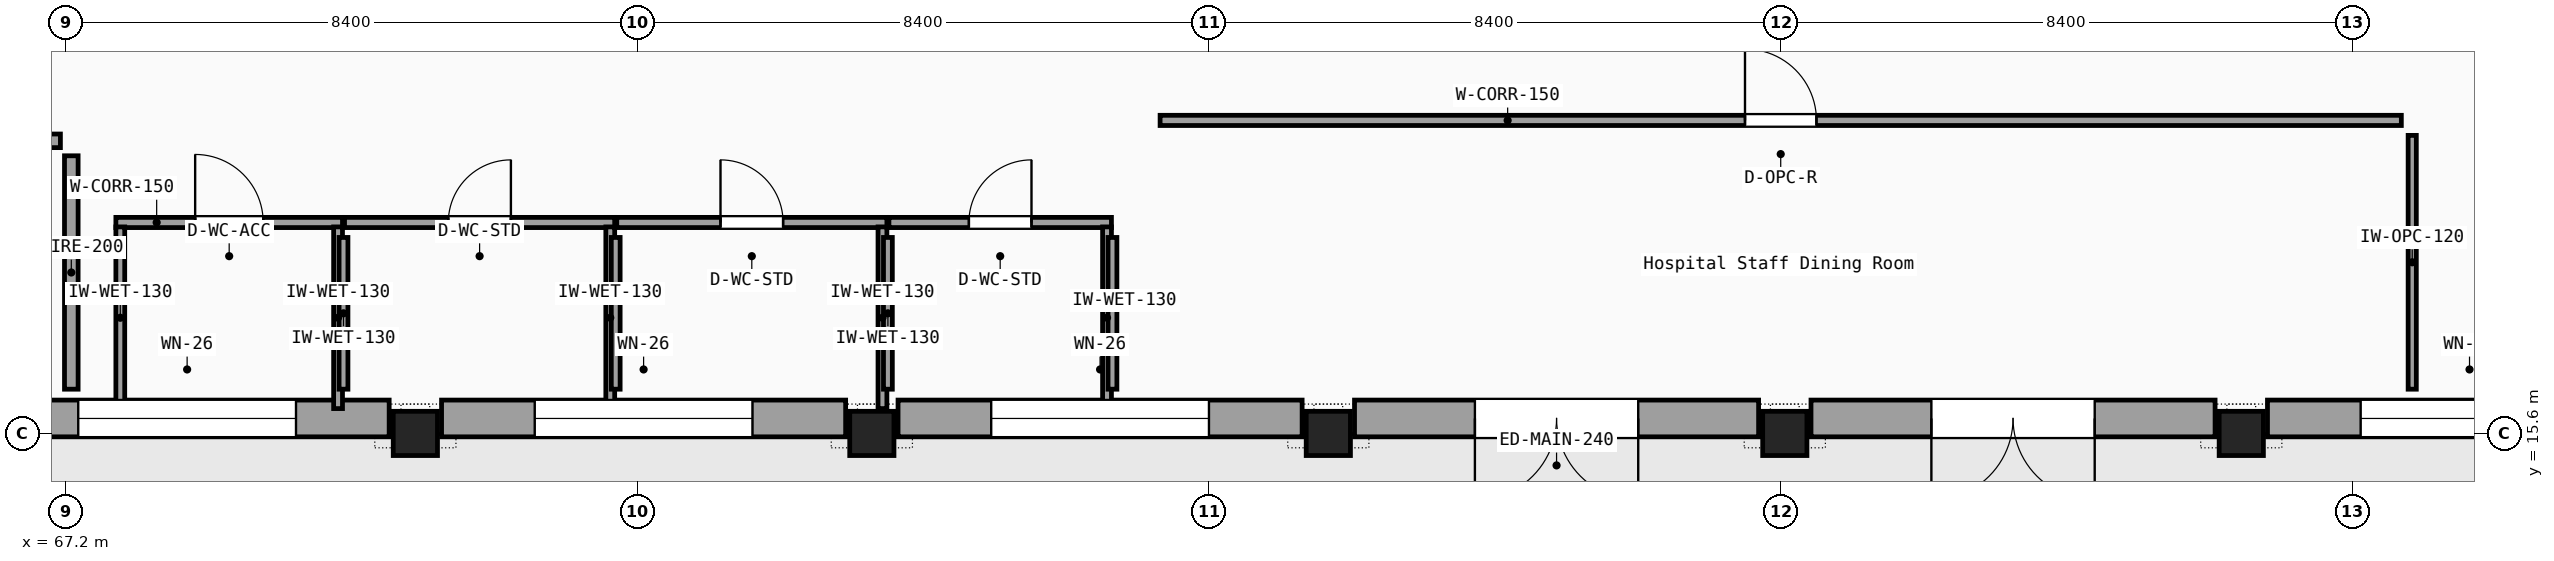
"""IFC4 building model, lengths in metres.
Left out: names, types, materials, properties, quantities, classifications, styles, units other than length and angle.
Written with IfcOpenShell. Run it as: python <this file> out.ifc"""

import sys

from ifc_helpers import new_model, si_unit, direction, frame, frame_2d, origin, origin_2d, place, context, subcontext, project, spatial, rectangle, circle, extrude, element, fill, save


model = new_model("IFC4")
c1 = context("Model", 3, precision=1e-05, world=origin(), true_north=direction((0.0, 1.0)))
c2 = subcontext(c1, "Body", "Model", "MODEL_VIEW")
j1 = project(units=[si_unit("LENGTHUNIT", "METRE"), si_unit("PLANEANGLEUNIT", "RADIAN")], contexts=[c1])
p1 = place(None, origin())
s1 = spatial("IfcSite", under=j1, at=p1, CompositionType="ELEMENT")
p2 = place(p1, origin())
s2 = spatial("IfcBuilding", under=s1, at=p2, CompositionType="ELEMENT")
p3 = place(p2, origin())
s3 = spatial("IfcBuildingStorey", under=s2, at=p3, CompositionType="ELEMENT", Elevation=0.0)
for number, where, z_axis, x_axis in (
    (1, (72.336, 15.6, 0.0), (0.0, 0.0, 1.0), (1.0, 0.0, 0.0)),
    (2, (79.044, 15.6, 0.0), (0.0, 0.0, 1.0), (1.0, 0.0, 0.0)),
    (3, (85.752, 15.6, 0.0), (0.0, 0.0, 1.0), (1.0, 0.0, 0.0)),
    (4, (92.46, 15.6, 0.0), (0.0, 0.0, 1.0), (1.0, 0.0, 0.0)),
    (5, (99.168, 15.6, 0.0), (0.0, 0.0, 1.0), (1.0, 0.0, 0.0)),
):
    element("IfcColumn", number, at=place(p3, frame(where, z_axis=z_axis, x_axis=x_axis)), inside=s3, PredefinedType="COLUMN", context=c2, shape_type="SweptSolid", body=[
        extrude(circle(Radius=0.325, at=origin_2d()), origin(), (0.0, 0.0, 1.0), 5.1),
    ])
p4 = place(p3, frame((66.013, 15.82, 0.0), z_axis=(0.0, 0.0, 1.0), x_axis=(1.0, 0.0, 0.0)))
e6 = element("IfcWall", 6, at=p4, inside=s3, PredefinedType="SOLIDWALL", context=c2, shape_type="SweptSolid", body=[
    extrude(rectangle(XDim=5.938, YDim=0.54, at=frame_2d((2.969, 0.0))), origin(), (0.0, 0.0, 1.0), 4.45),
])
p5 = place(p4, frame((1.369, 0.0, 0.75)))
e7 = element("IfcOpeningElement", 7, at=p5, cuts=e6, PredefinedType="OPENING", context=c2, shape_type="SweptSolid", body=[
    extrude(rectangle(XDim=3.2, YDim=1.8, at=frame_2d((1.6, 0.9))), frame((0.0, 0.28, 0.0), z_axis=(0.0, -1.0, 0.0), x_axis=(1.0, 0.0, 0.0)), (0.0, 0.0, 1.0), 0.56),
])
p6 = place(p3, frame((72.721, 15.82, 0.0), z_axis=(0.0, 0.0, 1.0), x_axis=(1.0, 0.0, 0.0)))
e8 = element("IfcWall", 8, at=p6, inside=s3, PredefinedType="SOLIDWALL", context=c2, shape_type="SweptSolid", body=[
    extrude(rectangle(XDim=5.938, YDim=0.54, at=frame_2d((2.969, 0.0))), origin(), (0.0, 0.0, 1.0), 4.45),
])
p7 = place(p6, frame((1.369, 0.0, 0.75)))
e9 = element("IfcOpeningElement", 9, at=p7, cuts=e8, PredefinedType="OPENING", context=c2, shape_type="SweptSolid", body=[
    extrude(rectangle(XDim=3.2, YDim=1.8, at=frame_2d((1.6, 0.9))), frame((0.0, 0.28, 0.0), z_axis=(0.0, -1.0, 0.0), x_axis=(1.0, 0.0, 0.0)), (0.0, 0.0, 1.0), 0.56),
])
p8 = place(p3, frame((79.429, 15.82, 0.0), z_axis=(0.0, 0.0, 1.0), x_axis=(1.0, 0.0, 0.0)))
e10 = element("IfcWall", 10, at=p8, inside=s3, PredefinedType="SOLIDWALL", context=c2, shape_type="SweptSolid", body=[
    extrude(rectangle(XDim=5.938, YDim=0.54, at=frame_2d((2.969, 0.0))), origin(), (0.0, 0.0, 1.0), 4.45),
])
p9 = place(p8, frame((1.369, 0.0, 0.75)))
e11 = element("IfcOpeningElement", 11, at=p9, cuts=e10, PredefinedType="OPENING", context=c2, shape_type="SweptSolid", body=[
    extrude(rectangle(XDim=3.2, YDim=1.8, at=frame_2d((1.6, 0.9))), frame((0.0, 0.28, 0.0), z_axis=(0.0, -1.0, 0.0), x_axis=(1.0, 0.0, 0.0)), (0.0, 0.0, 1.0), 0.56),
])
p10 = place(p3, frame((86.137, 15.82, 0.0), z_axis=(0.0, 0.0, 1.0), x_axis=(1.0, 0.0, 0.0)))
e12 = element("IfcWall", 12, at=p10, inside=s3, PredefinedType="SOLIDWALL", context=c2, shape_type="SweptSolid", body=[
    extrude(rectangle(XDim=5.938, YDim=0.54, at=frame_2d((2.969, 0.0))), origin(), (0.0, 0.0, 1.0), 4.45),
])
p11 = place(p10, frame((1.769, 0.0, 0.0)))
e13 = element("IfcOpeningElement", 13, at=p11, cuts=e12, PredefinedType="OPENING", context=c2, shape_type="SweptSolid", body=[
    extrude(rectangle(XDim=2.4, YDim=2.6, at=frame_2d((1.2, 1.3))), frame((0.0, 0.28, 0.0), z_axis=(0.0, -1.0, 0.0), x_axis=(1.0, 0.0, 0.0)), (0.0, 0.0, 1.0), 0.56),
])
p12 = place(p3, frame((92.845, 15.82, 0.0), z_axis=(0.0, 0.0, 1.0), x_axis=(1.0, 0.0, 0.0)))
e14 = element("IfcWall", 14, at=p12, inside=s3, PredefinedType="SOLIDWALL", context=c2, shape_type="SweptSolid", body=[
    extrude(rectangle(XDim=5.938, YDim=0.54, at=frame_2d((2.969, 0.0))), origin(), (0.0, 0.0, 1.0), 4.45),
])
p13 = place(p12, frame((1.769, 0.0, 0.0)))
e15 = element("IfcOpeningElement", 15, at=p13, cuts=e14, PredefinedType="OPENING", context=c2, shape_type="SweptSolid", body=[
    extrude(rectangle(XDim=2.4, YDim=2.6, at=frame_2d((1.2, 1.3))), frame((0.0, 0.28, 0.0), z_axis=(0.0, -1.0, 0.0), x_axis=(1.0, 0.0, 0.0)), (0.0, 0.0, 1.0), 0.56),
])
p14 = place(p3, frame((99.553, 15.82, 0.0), z_axis=(0.0, 0.0, 1.0), x_axis=(1.0, 0.0, 0.0)))
e16 = element("IfcWall", 16, at=p14, inside=s3, PredefinedType="SOLIDWALL", context=c2, shape_type="SweptSolid", body=[
    extrude(rectangle(XDim=5.938, YDim=0.54, at=frame_2d((2.969, 0.0))), origin(), (0.0, 0.0, 1.0), 4.45),
])
p15 = place(p14, frame((1.369, 0.0, 0.75)))
e17 = element("IfcOpeningElement", 17, at=p15, cuts=e16, PredefinedType="OPENING", context=c2, shape_type="SweptSolid", body=[
    extrude(rectangle(XDim=3.2, YDim=1.8, at=frame_2d((1.6, 0.9))), frame((0.0, 0.28, 0.0), z_axis=(0.0, -1.0, 0.0), x_axis=(1.0, 0.0, 0.0)), (0.0, 0.0, 1.0), 0.56),
])
p16 = place(p3, frame((60.28, 19.9, 0.0), z_axis=(0.0, 0.0, 1.0), x_axis=(1.0, 0.0, 0.0)))
e18 = element("IfcWall", 18, at=p16, inside=s3, PredefinedType="PARTITIONING", context=c2, shape_type="SweptSolid", body=[
    extrude(rectangle(XDim=6.84, YDim=0.2, at=frame_2d((3.42, 0.0))), origin(), (0.0, 0.0, 1.0), 4.82),
])
p17 = place(p16, frame((2.67, 0.0, 0.0)))
e19 = element("IfcOpeningElement", 19, at=p17, cuts=e18, PredefinedType="OPENING", context=c2, shape_type="SweptSolid", body=[
    extrude(rectangle(XDim=1.5, YDim=2.25, at=frame_2d((0.75, 1.125))), frame((0.0, 0.11, 0.0), z_axis=(0.0, -1.0, 0.0), x_axis=(1.0, 0.0, 0.0)), (0.0, 0.0, 1.0), 0.22),
])
p18 = place(p3, frame((67.28, 16.25, 0.0), z_axis=(0.0, 0.0, 1.0), x_axis=(0.0, 1.0, 0.0)))
e20 = element("IfcWall", 20, at=p18, inside=s3, PredefinedType="PARTITIONING", context=c2, shape_type="SweptSolid", body=[
    extrude(rectangle(XDim=3.43, YDim=0.2, at=frame_2d((1.715, 0.0))), origin(), (0.0, 0.0, 1.0), 4.82),
])
p19 = place(p3, frame((67.935, 18.7, 0.0), z_axis=(0.0, 0.0, 1.0), x_axis=(1.0, 0.0, 0.0)))
e21 = element("IfcWall", 21, at=p19, inside=s3, PredefinedType="PARTITIONING", context=c2, shape_type="SweptSolid", body=[
    extrude(rectangle(XDim=3.33, YDim=0.15, at=frame_2d((1.665, 0.0))), origin(), (0.0, 0.0, 1.0), 4.82),
])
p20 = place(p19, frame((1.165, 0.0, 0.0)))
e22 = element("IfcOpeningElement", 22, at=p20, cuts=e21, PredefinedType="OPENING", context=c2, shape_type="SweptSolid", body=[
    extrude(rectangle(XDim=1.0, YDim=2.15, at=frame_2d((0.5, 1.075))), frame((0.0, 0.085, 0.0), z_axis=(0.0, -1.0, 0.0), x_axis=(1.0, 0.0, 0.0)), (0.0, 0.0, 1.0), 0.17),
])
for number, where, z_axis, x_axis in (
    (23, (68.0, 15.965, 0.0), (0.0, 0.0, 1.0), (0.0, 1.0, 0.0)),
    (24, (71.2, 15.965, 0.0), (0.0, 0.0, 1.0), (0.0, 1.0, 0.0)),
):
    element("IfcWall", number, at=place(p3, frame(where, z_axis=z_axis, x_axis=x_axis)), inside=s3, PredefinedType="PARTITIONING", context=c2, shape_type="SweptSolid", body=[
        extrude(rectangle(XDim=2.67, YDim=0.13, at=frame_2d((1.335, 0.0))), origin(), (0.0, 0.0, 1.0), 4.82),
    ])
p21 = place(p3, frame((71.28, 16.25, 0.0), z_axis=(0.0, 0.0, 1.0), x_axis=(0.0, 1.0, 0.0)))
e25 = element("IfcWall", 25, at=p21, inside=s3, PredefinedType="PARTITIONING", context=c2, shape_type="SweptSolid", body=[
    extrude(rectangle(XDim=2.23, YDim=0.13, at=frame_2d((1.115, 0.0))), origin(), (0.0, 0.0, 1.0), 4.82),
])
p22 = place(p3, frame((71.295, 18.7, 0.0), z_axis=(0.0, 0.0, 1.0), x_axis=(1.0, 0.0, 0.0)))
e26 = element("IfcWall", 26, at=p22, inside=s3, PredefinedType="PARTITIONING", context=c2, shape_type="SweptSolid", body=[
    extrude(rectangle(XDim=3.97, YDim=0.15, at=frame_2d((1.985, 0.0))), origin(), (0.0, 0.0, 1.0), 4.82),
])
p23 = place(p22, frame((1.525, 0.0, 0.0)))
e27 = element("IfcOpeningElement", 27, at=p23, cuts=e26, PredefinedType="OPENING", context=c2, shape_type="SweptSolid", body=[
    extrude(rectangle(XDim=0.92, YDim=2.15, at=frame_2d((0.46, 1.075))), frame((0.0, 0.085, 0.0), z_axis=(0.0, -1.0, 0.0), x_axis=(1.0, 0.0, 0.0)), (0.0, 0.0, 1.0), 0.17),
])
p24 = place(p3, frame((75.2, 15.965, 0.0), z_axis=(0.0, 0.0, 1.0), x_axis=(0.0, 1.0, 0.0)))
e28 = element("IfcWall", 28, at=p24, inside=s3, PredefinedType="PARTITIONING", context=c2, shape_type="SweptSolid", body=[
    extrude(rectangle(XDim=2.67, YDim=0.13, at=frame_2d((1.335, 0.0))), origin(), (0.0, 0.0, 1.0), 4.82),
])
p25 = place(p3, frame((75.28, 16.25, 0.0), z_axis=(0.0, 0.0, 1.0), x_axis=(0.0, 1.0, 0.0)))
e29 = element("IfcWall", 29, at=p25, inside=s3, PredefinedType="PARTITIONING", context=c2, shape_type="SweptSolid", body=[
    extrude(rectangle(XDim=2.23, YDim=0.13, at=frame_2d((1.115, 0.0))), origin(), (0.0, 0.0, 1.0), 4.82),
])
p26 = place(p3, frame((75.295, 18.7, 0.0), z_axis=(0.0, 0.0, 1.0), x_axis=(1.0, 0.0, 0.0)))
e30 = element("IfcWall", 30, at=p26, inside=s3, PredefinedType="PARTITIONING", context=c2, shape_type="SweptSolid", body=[
    extrude(rectangle(XDim=3.97, YDim=0.15, at=frame_2d((1.985, 0.0))), origin(), (0.0, 0.0, 1.0), 4.82),
])
p27 = place(p26, frame((1.525, 0.0, 0.0)))
e31 = element("IfcOpeningElement", 31, at=p27, cuts=e30, PredefinedType="OPENING", context=c2, shape_type="SweptSolid", body=[
    extrude(rectangle(XDim=0.92, YDim=2.15, at=frame_2d((0.46, 1.075))), frame((0.0, 0.085, 0.0), z_axis=(0.0, -1.0, 0.0), x_axis=(1.0, 0.0, 0.0)), (0.0, 0.0, 1.0), 0.17),
])
p28 = place(p3, frame((79.2, 15.965, 0.0), z_axis=(0.0, 0.0, 1.0), x_axis=(0.0, 1.0, 0.0)))
e32 = element("IfcWall", 32, at=p28, inside=s3, PredefinedType="PARTITIONING", context=c2, shape_type="SweptSolid", body=[
    extrude(rectangle(XDim=2.67, YDim=0.13, at=frame_2d((1.335, 0.0))), origin(), (0.0, 0.0, 1.0), 4.82),
])
p29 = place(p3, frame((79.28, 16.25, 0.0), z_axis=(0.0, 0.0, 1.0), x_axis=(0.0, 1.0, 0.0)))
e33 = element("IfcWall", 33, at=p29, inside=s3, PredefinedType="PARTITIONING", context=c2, shape_type="SweptSolid", body=[
    extrude(rectangle(XDim=2.23, YDim=0.13, at=frame_2d((1.115, 0.0))), origin(), (0.0, 0.0, 1.0), 4.82),
])
p30 = place(p3, frame((79.295, 18.7, 0.0), z_axis=(0.0, 0.0, 1.0), x_axis=(1.0, 0.0, 0.0)))
e34 = element("IfcWall", 34, at=p30, inside=s3, PredefinedType="PARTITIONING", context=c2, shape_type="SweptSolid", body=[
    extrude(rectangle(XDim=3.27, YDim=0.15, at=frame_2d((1.635, 0.0))), origin(), (0.0, 0.0, 1.0), 4.82),
])
p31 = place(p30, frame((1.175, 0.0, 0.0)))
e35 = element("IfcOpeningElement", 35, at=p31, cuts=e34, PredefinedType="OPENING", context=c2, shape_type="SweptSolid", body=[
    extrude(rectangle(XDim=0.92, YDim=2.15, at=frame_2d((0.46, 1.075))), frame((0.0, 0.085, 0.0), z_axis=(0.0, -1.0, 0.0), x_axis=(1.0, 0.0, 0.0)), (0.0, 0.0, 1.0), 0.17),
])
p32 = place(p3, frame((82.5, 15.965, 0.0), z_axis=(0.0, 0.0, 1.0), x_axis=(0.0, 1.0, 0.0)))
e36 = element("IfcWall", 36, at=p32, inside=s3, PredefinedType="PARTITIONING", context=c2, shape_type="SweptSolid", body=[
    extrude(rectangle(XDim=2.67, YDim=0.13, at=frame_2d((1.335, 0.0))), origin(), (0.0, 0.0, 1.0), 4.82),
])
p33 = place(p3, frame((82.58, 16.25, 0.0), z_axis=(0.0, 0.0, 1.0), x_axis=(0.0, 1.0, 0.0)))
e37 = element("IfcWall", 37, at=p33, inside=s3, PredefinedType="PARTITIONING", context=c2, shape_type="SweptSolid", body=[
    extrude(rectangle(XDim=2.23, YDim=0.13, at=frame_2d((1.115, 0.0))), origin(), (0.0, 0.0, 1.0), 4.82),
])
p34 = place(p3, frame((83.28, 20.2, 0.0), z_axis=(0.0, 0.0, 1.0), x_axis=(1.0, 0.0, 0.0)))
e38 = element("IfcWall", 38, at=p34, inside=s3, PredefinedType="PARTITIONING", context=c2, shape_type="SweptSolid", body=[
    extrude(rectangle(XDim=18.24, YDim=0.15, at=frame_2d((9.12, 0.0))), origin(), (0.0, 0.0, 1.0), 4.82),
])
p35 = place(p34, frame((8.595, 0.0, 0.0)))
e39 = element("IfcOpeningElement", 39, at=p35, cuts=e38, PredefinedType="OPENING", context=c2, shape_type="SweptSolid", body=[
    extrude(rectangle(XDim=1.05, YDim=2.15, at=frame_2d((0.525, 1.075))), frame((0.0, 0.085, 0.0), z_axis=(0.0, -1.0, 0.0), x_axis=(1.0, 0.0, 0.0)), (0.0, 0.0, 1.0), 0.17),
])
p36 = place(p3, frame((101.68, 16.25, 0.0), z_axis=(0.0, 0.0, 1.0), x_axis=(0.0, 1.0, 0.0)))
e40 = element("IfcWall", 40, at=p36, inside=s3, PredefinedType="PARTITIONING", context=c2, shape_type="SweptSolid", body=[
    extrude(rectangle(XDim=3.73, YDim=0.12, at=frame_2d((1.865, 0.0))), origin(), (0.0, 0.0, 1.0), 4.82),
])
p37 = place(p5, origin())
e41 = element("IfcWindow", 41, at=p37, inside=s3, PartitioningType="SINGLE_PANEL", PredefinedType="WINDOW", context=c2, shape_type="SweptSolid", body=[
    extrude(rectangle(XDim=3.2, YDim=1.8, at=frame_2d((1.6, 0.9))), frame((0.0, 0.03, 0.0), z_axis=(0.0, -1.0, 0.0), x_axis=(1.0, 0.0, 0.0)), (0.0, 0.0, 1.0), 0.06),
])
fill(e7, e41)
p38 = place(p7, origin())
e42 = element("IfcWindow", 42, at=p38, inside=s3, PartitioningType="SINGLE_PANEL", PredefinedType="WINDOW", context=c2, shape_type="SweptSolid", body=[
    extrude(rectangle(XDim=3.2, YDim=1.8, at=frame_2d((1.6, 0.9))), frame((0.0, 0.03, 0.0), z_axis=(0.0, -1.0, 0.0), x_axis=(1.0, 0.0, 0.0)), (0.0, 0.0, 1.0), 0.06),
])
fill(e9, e42)
p39 = place(p9, origin())
e43 = element("IfcWindow", 43, at=p39, inside=s3, PartitioningType="SINGLE_PANEL", PredefinedType="WINDOW", context=c2, shape_type="SweptSolid", body=[
    extrude(rectangle(XDim=3.2, YDim=1.8, at=frame_2d((1.6, 0.9))), frame((0.0, 0.03, 0.0), z_axis=(0.0, -1.0, 0.0), x_axis=(1.0, 0.0, 0.0)), (0.0, 0.0, 1.0), 0.06),
])
fill(e11, e43)
p40 = place(p11, frame((2.4, 0.0, 0.0), z_axis=(0.0, 0.0, 1.0), x_axis=(-1.0, 0.0, 0.0)))
e44 = element("IfcDoor", 44, at=p40, inside=s3, OperationType="DOUBLE_DOOR_SINGLE_SWING", PredefinedType="DOOR", context=c2, shape_type="SweptSolid", body=[
    extrude(rectangle(XDim=2.4, YDim=2.6, at=frame_2d((1.2, 1.3))), frame((0.0, 0.025, 0.0), z_axis=(0.0, -1.0, 0.0), x_axis=(1.0, 0.0, 0.0)), (0.0, 0.0, 1.0), 0.05),
])
fill(e13, e44)
p41 = place(p13, frame((2.4, 0.0, 0.0), z_axis=(0.0, 0.0, 1.0), x_axis=(-1.0, 0.0, 0.0)))
e45 = element("IfcDoor", 45, at=p41, inside=s3, OperationType="DOUBLE_DOOR_SINGLE_SWING", PredefinedType="DOOR", context=c2, shape_type="SweptSolid", body=[
    extrude(rectangle(XDim=2.4, YDim=2.6, at=frame_2d((1.2, 1.3))), frame((0.0, 0.025, 0.0), z_axis=(0.0, -1.0, 0.0), x_axis=(1.0, 0.0, 0.0)), (0.0, 0.0, 1.0), 0.05),
])
fill(e15, e45)
p42 = place(p15, origin())
e46 = element("IfcWindow", 46, at=p42, inside=s3, PartitioningType="SINGLE_PANEL", PredefinedType="WINDOW", context=c2, shape_type="SweptSolid", body=[
    extrude(rectangle(XDim=3.2, YDim=1.8, at=frame_2d((1.6, 0.9))), frame((0.0, 0.03, 0.0), z_axis=(0.0, -1.0, 0.0), x_axis=(1.0, 0.0, 0.0)), (0.0, 0.0, 1.0), 0.06),
])
fill(e17, e46)
p43 = place(p20, origin())
e47 = element("IfcDoor", 47, at=p43, inside=s3, OperationType="SINGLE_SWING_LEFT", PredefinedType="DOOR", context=c2, shape_type="SweptSolid", body=[
    extrude(rectangle(XDim=1.0, YDim=2.15, at=frame_2d((0.5, 1.075))), frame((0.0, 0.025, 0.0), z_axis=(0.0, -1.0, 0.0), x_axis=(1.0, 0.0, 0.0)), (0.0, 0.0, 1.0), 0.05),
])
fill(e22, e47)
p44 = place(p23, origin())
e48 = element("IfcDoor", 48, at=p44, inside=s3, OperationType="SINGLE_SWING_RIGHT", PredefinedType="DOOR", context=c2, shape_type="SweptSolid", body=[
    extrude(rectangle(XDim=0.92, YDim=2.15, at=frame_2d((0.46, 1.075))), frame((0.0, 0.025, 0.0), z_axis=(0.0, -1.0, 0.0), x_axis=(1.0, 0.0, 0.0)), (0.0, 0.0, 1.0), 0.05),
])
fill(e27, e48)
p45 = place(p27, origin())
e49 = element("IfcDoor", 49, at=p45, inside=s3, OperationType="SINGLE_SWING_LEFT", PredefinedType="DOOR", context=c2, shape_type="SweptSolid", body=[
    extrude(rectangle(XDim=0.92, YDim=2.15, at=frame_2d((0.46, 1.075))), frame((0.0, 0.025, 0.0), z_axis=(0.0, -1.0, 0.0), x_axis=(1.0, 0.0, 0.0)), (0.0, 0.0, 1.0), 0.05),
])
fill(e31, e49)
p46 = place(p31, origin())
e50 = element("IfcDoor", 50, at=p46, inside=s3, OperationType="SINGLE_SWING_RIGHT", PredefinedType="DOOR", context=c2, shape_type="SweptSolid", body=[
    extrude(rectangle(XDim=0.92, YDim=2.15, at=frame_2d((0.46, 1.075))), frame((0.0, 0.025, 0.0), z_axis=(0.0, -1.0, 0.0), x_axis=(1.0, 0.0, 0.0)), (0.0, 0.0, 1.0), 0.05),
])
fill(e35, e50)
p47 = place(p35, origin())
e51 = element("IfcDoor", 51, at=p47, inside=s3, OperationType="SINGLE_SWING_LEFT", PredefinedType="DOOR", context=c2, shape_type="SweptSolid", body=[
    extrude(rectangle(XDim=1.05, YDim=2.15, at=frame_2d((0.525, 1.075))), frame((0.0, 0.025, 0.0), z_axis=(0.0, -1.0, 0.0), x_axis=(1.0, 0.0, 0.0)), (0.0, 0.0, 1.0), 0.05),
])
fill(e39, e51)
save(model, sys.argv[1])
